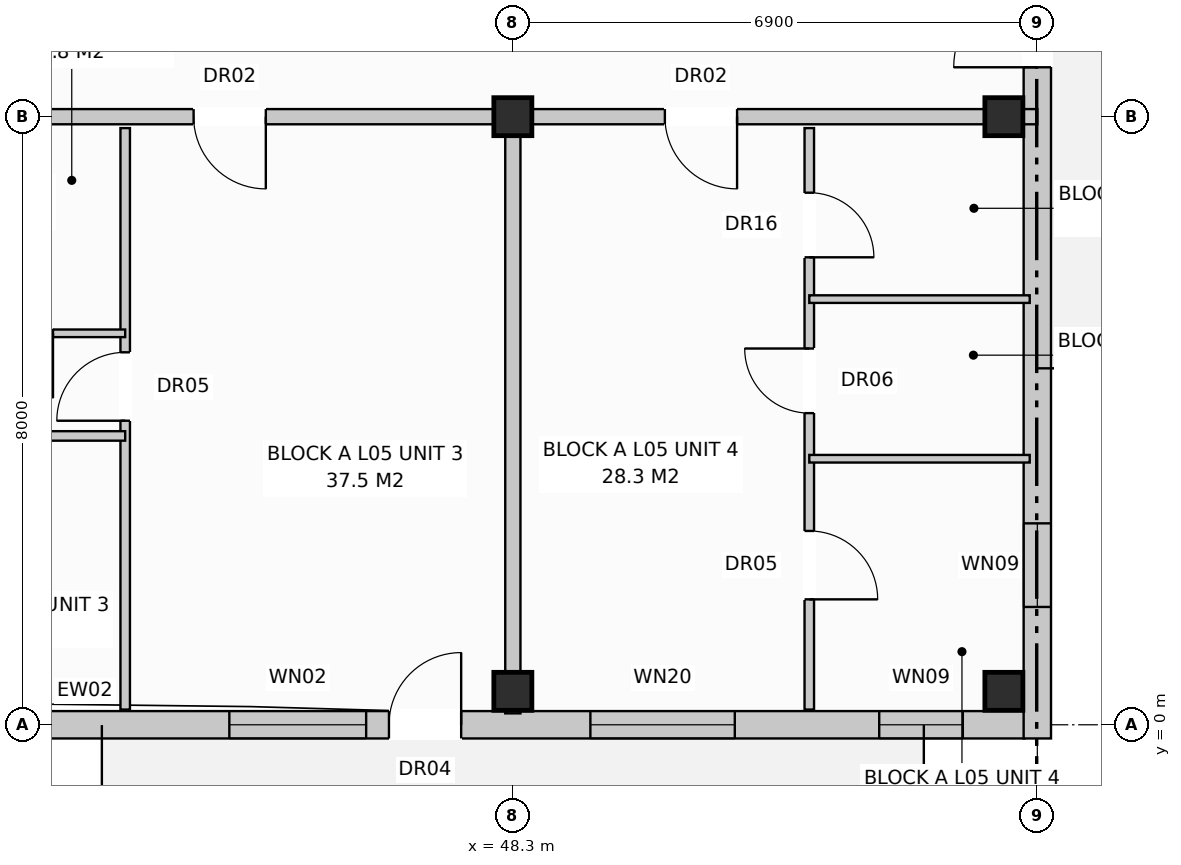
"""IFC4 building model, lengths in metres.
Left out: names, types, materials, properties, quantities, classifications, styles, units other than length and angle.
Written with IfcOpenShell. Run it as: python <this file> out.ifc"""

import sys

from ifc_helpers import new_model, si_unit, direction, frame, frame_2d, origin, origin_with_axes, origin_2d, place, context, subcontext, project, spatial, rectangle, extrude, element, fill, save


model = new_model("IFC4")
c1 = context("Model", 3, precision=1e-05, world=origin(), true_north=direction((0.0, 1.0)))
c2 = subcontext(c1, "Body", "Model", "MODEL_VIEW")
j1 = project(units=[si_unit("LENGTHUNIT", "METRE"), si_unit("PLANEANGLEUNIT", "RADIAN")], contexts=[c1])
p1 = place(None, origin())
s1 = spatial("IfcSite", under=j1, at=p1, CompositionType="ELEMENT")
p2 = place(p1, origin())
s2 = spatial("IfcBuilding", under=s1, at=p2, CompositionType="ELEMENT")
p3 = place(p2, frame((0.0, 0.0, 17.6)))
s3 = spatial("IfcBuildingStorey", under=s2, at=p3, CompositionType="ELEMENT", Elevation=17.6)
for number, where, z_axis, x_axis in (
    (1, (48.3, 0.44, 0.0), (0.0, 0.0, 1.0), (1.0, 0.0, 0.0)),
    (2, (48.3, 8.0, 0.0), (0.0, 0.0, 1.0), (1.0, 0.0, 0.0)),
    (3, (54.76, 0.44, 0.0), (0.0, 0.0, 1.0), (1.0, 0.0, 0.0)),
    (4, (54.76, 8.0, 0.0), (0.0, 0.0, 1.0), (1.0, 0.0, 0.0)),
):
    element("IfcColumn", number, at=place(p3, frame(where, z_axis=z_axis, x_axis=x_axis)), inside=s3, PredefinedType="COLUMN", context=c2, shape_type="SweptSolid", body=[
        extrude(rectangle(XDim=0.5, YDim=0.5, at=origin_2d()), origin(), (0.0, 0.0, 1.0), 3.2),
    ])
p4 = place(p3, frame((0.17, 0.0, 0.0), z_axis=(0.0, 0.0, 1.0), x_axis=(1.0, 0.0, 0.0)))
e5 = element("IfcWall", 5, at=p4, inside=s3, PredefinedType="STANDARD", context=c2, shape_type="SweptSolid", body=[
    extrude(rectangle(XDim=54.86, YDim=0.36, at=frame_2d((27.43, 0.0))), origin(), (0.0, 0.0, 1.0), 2.95),
])
p5 = place(p4, frame((3.823, 0.0, 0.0)))
e6 = element("IfcOpeningElement", 6, at=p5, cuts=e5, PredefinedType="OPENING", context=c2, shape_type="SweptSolid", body=[
    extrude(rectangle(XDim=0.95, YDim=2.1, at=frame_2d((0.475, 1.05))), frame((0.0, 0.192, 0.0), z_axis=(0.0, -1.0, 0.0), x_axis=(1.0, 0.0, 0.0)), (0.0, 0.0, 1.0), 0.384),
])
p6 = place(p4, frame((18.723, 0.0, 0.0)))
e7 = element("IfcOpeningElement", 7, at=p6, cuts=e5, PredefinedType="OPENING", context=c2, shape_type="SweptSolid", body=[
    extrude(rectangle(XDim=0.95, YDim=2.1, at=frame_2d((0.475, 1.05))), frame((0.0, 0.192, 0.0), z_axis=(0.0, -1.0, 0.0), x_axis=(1.0, 0.0, 0.0)), (0.0, 0.0, 1.0), 0.384),
])
p7 = place(p4, frame((29.123, 0.0, 0.0)))
e8 = element("IfcOpeningElement", 8, at=p7, cuts=e5, PredefinedType="OPENING", context=c2, shape_type="SweptSolid", body=[
    extrude(rectangle(XDim=0.95, YDim=2.1, at=frame_2d((0.475, 1.05))), frame((0.0, 0.192, 0.0), z_axis=(0.0, -1.0, 0.0), x_axis=(1.0, 0.0, 0.0)), (0.0, 0.0, 1.0), 0.384),
])
p8 = place(p4, frame((46.5, 0.0, 0.0)))
e9 = element("IfcOpeningElement", 9, at=p8, cuts=e5, PredefinedType="OPENING", context=c2, shape_type="SweptSolid", body=[
    extrude(rectangle(XDim=0.95, YDim=2.1, at=frame_2d((0.475, 1.05))), frame((0.0, 0.192, 0.0), z_axis=(0.0, -1.0, 0.0), x_axis=(1.0, 0.0, 0.0)), (0.0, 0.0, 1.0), 0.384),
])
p9 = place(p4, frame((1.6, 0.0, 0.8)))
e10 = element("IfcOpeningElement", 10, at=p9, cuts=e5, PredefinedType="OPENING", context=c2, shape_type="SweptSolid", body=[
    extrude(rectangle(XDim=1.8, YDim=1.7, at=frame_2d((0.9, 0.85))), frame((0.0, 0.192, 0.0), z_axis=(0.0, -1.0, 0.0), x_axis=(1.0, 0.0, 0.0)), (0.0, 0.0, 1.0), 0.384),
])
p10 = place(p4, frame((7.232, 0.0, 0.72)))
e11 = element("IfcOpeningElement", 11, at=p10, cuts=e5, PredefinedType="OPENING", context=c2, shape_type="SweptSolid", body=[
    extrude(rectangle(XDim=1.9, YDim=1.85, at=frame_2d((0.95, 0.925))), frame((0.0, 0.192, 0.0), z_axis=(0.0, -1.0, 0.0), x_axis=(1.0, 0.0, 0.0)), (0.0, 0.0, 1.0), 0.384),
])
p11 = place(p4, frame((10.425, 0.0, 0.8)))
e12 = element("IfcOpeningElement", 12, at=p11, cuts=e5, PredefinedType="OPENING", context=c2, shape_type="SweptSolid", body=[
    extrude(rectangle(XDim=1.95, YDim=1.65, at=frame_2d((0.975, 0.825))), frame((0.0, 0.192, 0.0), z_axis=(0.0, -1.0, 0.0), x_axis=(1.0, 0.0, 0.0)), (0.0, 0.0, 1.0), 0.384),
])
p12 = place(p4, frame((15.9, 0.0, 0.8)))
e13 = element("IfcOpeningElement", 13, at=p12, cuts=e5, PredefinedType="OPENING", context=c2, shape_type="SweptSolid", body=[
    extrude(rectangle(XDim=1.8, YDim=1.7, at=frame_2d((0.9, 0.85))), frame((0.0, 0.192, 0.0), z_axis=(0.0, -1.0, 0.0), x_axis=(1.0, 0.0, 0.0)), (0.0, 0.0, 1.0), 0.384),
])
p13 = place(p4, frame((21.55, 0.0, 0.72)))
e14 = element("IfcOpeningElement", 14, at=p13, cuts=e5, PredefinedType="OPENING", context=c2, shape_type="SweptSolid", body=[
    extrude(rectangle(XDim=1.9, YDim=1.85, at=frame_2d((0.95, 0.925))), frame((0.0, 0.192, 0.0), z_axis=(0.0, -1.0, 0.0), x_axis=(1.0, 0.0, 0.0)), (0.0, 0.0, 1.0), 0.384),
])
p14 = place(p4, frame((25.6, 0.0, 0.72)))
e15 = element("IfcOpeningElement", 15, at=p14, cuts=e5, PredefinedType="OPENING", context=c2, shape_type="SweptSolid", body=[
    extrude(rectangle(XDim=1.1, YDim=1.5, at=frame_2d((0.55, 0.75))), frame((0.0, 0.192, 0.0), z_axis=(0.0, -1.0, 0.0), x_axis=(1.0, 0.0, 0.0)), (0.0, 0.0, 1.0), 0.384),
])
p15 = place(p4, frame((31.4, 0.0, 0.8)))
e16 = element("IfcOpeningElement", 16, at=p15, cuts=e5, PredefinedType="OPENING", context=c2, shape_type="SweptSolid", body=[
    extrude(rectangle(XDim=1.8, YDim=1.7, at=frame_2d((0.9, 0.85))), frame((0.0, 0.192, 0.0), z_axis=(0.0, -1.0, 0.0), x_axis=(1.0, 0.0, 0.0)), (0.0, 0.0, 1.0), 0.384),
])
p16 = place(p4, frame((35.55, 0.0, 0.72)))
e17 = element("IfcOpeningElement", 17, at=p16, cuts=e5, PredefinedType="OPENING", context=c2, shape_type="SweptSolid", body=[
    extrude(rectangle(XDim=1.9, YDim=1.85, at=frame_2d((0.95, 0.925))), frame((0.0, 0.192, 0.0), z_axis=(0.0, -1.0, 0.0), x_axis=(1.0, 0.0, 0.0)), (0.0, 0.0, 1.0), 0.384),
])
p17 = place(p4, frame((39.25, 0.0, 0.72)))
e18 = element("IfcOpeningElement", 18, at=p17, cuts=e5, PredefinedType="OPENING", context=c2, shape_type="SweptSolid", body=[
    extrude(rectangle(XDim=1.1, YDim=1.5, at=frame_2d((0.55, 0.75))), frame((0.0, 0.192, 0.0), z_axis=(0.0, -1.0, 0.0), x_axis=(1.0, 0.0, 0.0)), (0.0, 0.0, 1.0), 0.384),
])
p18 = place(p4, frame((44.4, 0.0, 0.8)))
e19 = element("IfcOpeningElement", 19, at=p18, cuts=e5, PredefinedType="OPENING", context=c2, shape_type="SweptSolid", body=[
    extrude(rectangle(XDim=1.8, YDim=1.7, at=frame_2d((0.9, 0.85))), frame((0.0, 0.192, 0.0), z_axis=(0.0, -1.0, 0.0), x_axis=(1.0, 0.0, 0.0)), (0.0, 0.0, 1.0), 0.384),
])
p19 = place(p4, frame((49.15, 0.0, 0.72)))
e20 = element("IfcOpeningElement", 20, at=p19, cuts=e5, PredefinedType="OPENING", context=c2, shape_type="SweptSolid", body=[
    extrude(rectangle(XDim=1.9, YDim=1.85, at=frame_2d((0.95, 0.925))), frame((0.0, 0.192, 0.0), z_axis=(0.0, -1.0, 0.0), x_axis=(1.0, 0.0, 0.0)), (0.0, 0.0, 1.0), 0.384),
])
p20 = place(p4, frame((52.95, 0.0, 0.72)))
e21 = element("IfcOpeningElement", 21, at=p20, cuts=e5, PredefinedType="OPENING", context=c2, shape_type="SweptSolid", body=[
    extrude(rectangle(XDim=1.1, YDim=1.5, at=frame_2d((0.55, 0.75))), frame((0.0, 0.192, 0.0), z_axis=(0.0, -1.0, 0.0), x_axis=(1.0, 0.0, 0.0)), (0.0, 0.0, 1.0), 0.384),
])
p21 = place(p3, frame((55.2, -0.18, 0.0), z_axis=(0.0, 0.0, 1.0), x_axis=(0.0, 1.0, 0.0)))
e22 = element("IfcWall", 22, at=p21, inside=s3, PredefinedType="STANDARD", context=c2, shape_type="SweptSolid", body=[
    extrude(rectangle(XDim=18.76, YDim=0.36, at=frame_2d((9.38, 0.0))), origin(), (0.0, 0.0, 1.0), 2.95),
])
p22 = place(p21, frame((8.83, 0.0, 0.0)))
e23 = element("IfcOpeningElement", 23, at=p22, cuts=e22, PredefinedType="OPENING", context=c2, shape_type="SweptSolid", body=[
    extrude(rectangle(XDim=1.1, YDim=2.1, at=frame_2d((0.55, 1.05))), frame((0.0, 0.192, 0.0), z_axis=(0.0, -1.0, 0.0), x_axis=(1.0, 0.0, 0.0)), (0.0, 0.0, 1.0), 0.384),
])
p23 = place(p21, frame((1.73, 0.0, 0.72)))
e24 = element("IfcOpeningElement", 24, at=p23, cuts=e22, PredefinedType="OPENING", context=c2, shape_type="SweptSolid", body=[
    extrude(rectangle(XDim=1.1, YDim=1.5, at=frame_2d((0.55, 0.75))), frame((0.0, 0.192, 0.0), z_axis=(0.0, -1.0, 0.0), x_axis=(1.0, 0.0, 0.0)), (0.0, 0.0, 1.0), 0.384),
])
p24 = place(p21, frame((15.93, 0.0, 0.72)))
e25 = element("IfcOpeningElement", 25, at=p24, cuts=e22, PredefinedType="OPENING", context=c2, shape_type="SweptSolid", body=[
    extrude(rectangle(XDim=1.1, YDim=1.5, at=frame_2d((0.55, 0.75))), frame((0.0, 0.192, 0.0), z_axis=(0.0, -1.0, 0.0), x_axis=(1.0, 0.0, 0.0)), (0.0, 0.0, 1.0), 0.384),
])
p25 = place(p3, frame((48.3, 7.85, 0.0), z_axis=(0.0, 0.0, 1.0), x_axis=(0.0, -1.0, 0.0)))
e26 = element("IfcWall", 26, at=p25, inside=s3, PredefinedType="PARTITIONING", context=c2, shape_type="SweptSolid", body=[
    extrude(rectangle(XDim=7.7, YDim=0.2, at=frame_2d((3.85, 0.0))), origin(), (0.0, 0.0, 1.0), 2.39),
])
p26 = place(p3, frame((34.5, 8.0, 0.0), z_axis=(0.0, 0.0, 1.0), x_axis=(1.0, 0.0, 0.0)))
e27 = element("IfcWall", 27, at=p26, inside=s3, PredefinedType="PARTITIONING", context=c2, shape_type="SweptSolid", body=[
    extrude(rectangle(XDim=13.8, YDim=0.2, at=frame_2d((6.9, 0.0))), origin(), (0.0, 0.0, 1.0), 2.39),
])
p27 = place(p26, frame((9.6, 0.0, 0.0)))
e28 = element("IfcOpeningElement", 28, at=p27, cuts=e27, PredefinedType="OPENING", context=c2, shape_type="SweptSolid", body=[
    extrude(rectangle(XDim=0.95, YDim=2.15, at=frame_2d((0.475, 1.075))), frame((0.0, 0.112, 0.0), z_axis=(0.0, -1.0, 0.0), x_axis=(1.0, 0.0, 0.0)), (0.0, 0.0, 1.0), 0.224),
])
p28 = place(p3, frame((43.2, 7.85, 0.0), z_axis=(0.0, 0.0, 1.0), x_axis=(0.0, -1.0, 0.0)))
e29 = element("IfcWall", 29, at=p28, inside=s3, PredefinedType="PARTITIONING", context=c2, shape_type="SweptSolid", body=[
    extrude(rectangle(XDim=7.65, YDim=0.125, at=frame_2d((3.825, 0.0))), origin(), (0.0, 0.0, 1.0), 2.95),
])
p29 = place(p28, frame((2.95, 0.0, 0.0)))
e30 = element("IfcOpeningElement", 30, at=p29, cuts=e29, PredefinedType="OPENING", context=c2, shape_type="SweptSolid", body=[
    extrude(rectangle(XDim=0.9, YDim=2.1, at=frame_2d((0.45, 1.05))), frame((0.0, 0.074, 0.0), z_axis=(0.0, -1.0, 0.0), x_axis=(1.0, 0.0, 0.0)), (0.0, 0.0, 1.0), 0.149),
])
p30 = place(p3, frame((34.6, 5.15, 0.0), z_axis=(0.0, 0.0, 1.0), x_axis=(1.0, 0.0, 0.0)))
e31 = element("IfcWall", 31, at=p30, inside=s3, PredefinedType="PARTITIONING", context=c2, shape_type="SweptSolid", body=[
    extrude(rectangle(XDim=8.6, YDim=0.1, at=frame_2d((4.3, 0.0))), origin(), (0.0, 0.0, 1.0), 2.95),
])
p31 = place(p30, frame((1.4, 0.0, 0.0)))
e32 = element("IfcOpeningElement", 32, at=p31, cuts=e31, PredefinedType="OPENING", context=c2, shape_type="SweptSolid", body=[
    extrude(rectangle(XDim=0.85, YDim=2.05, at=frame_2d((0.425, 1.025))), frame((0.0, 0.062, 0.0), z_axis=(0.0, -1.0, 0.0), x_axis=(1.0, 0.0, 0.0)), (0.0, 0.0, 1.0), 0.124),
])
p32 = place(p30, frame((4.65, 0.0, 0.0)))
e33 = element("IfcOpeningElement", 33, at=p32, cuts=e31, PredefinedType="OPENING", context=c2, shape_type="SweptSolid", body=[
    extrude(rectangle(XDim=0.85, YDim=2.05, at=frame_2d((0.425, 1.025))), frame((0.0, 0.062, 0.0), z_axis=(0.0, -1.0, 0.0), x_axis=(1.0, 0.0, 0.0)), (0.0, 0.0, 1.0), 0.124),
])
p33 = place(p30, frame((6.8, 0.0, 0.0)))
e34 = element("IfcOpeningElement", 34, at=p33, cuts=e31, PredefinedType="OPENING", context=c2, shape_type="SweptSolid", body=[
    extrude(rectangle(XDim=0.85, YDim=2.1, at=frame_2d((0.425, 1.05))), frame((0.0, 0.062, 0.0), z_axis=(0.0, -1.0, 0.0), x_axis=(1.0, 0.0, 0.0)), (0.0, 0.0, 1.0), 0.124),
])
p34 = place(p3, frame((38.7, 3.8, 0.0), z_axis=(0.0, 0.0, 1.0), x_axis=(1.0, 0.0, 0.0)))
e35 = element("IfcWall", 35, at=p34, inside=s3, PredefinedType="PARTITIONING", context=c2, shape_type="SweptSolid", body=[
    extrude(rectangle(XDim=4.5, YDim=0.125, at=frame_2d((2.25, 0.0))), origin(), (0.0, 0.0, 1.0), 2.95),
])
p35 = place(p34, frame((1.6, 0.0, 0.0)))
e36 = element("IfcOpeningElement", 36, at=p35, cuts=e35, PredefinedType="OPENING", context=c2, shape_type="SweptSolid", body=[
    extrude(rectangle(XDim=0.9, YDim=2.1, at=frame_2d((0.45, 1.05))), frame((0.0, 0.074, 0.0), z_axis=(0.0, -1.0, 0.0), x_axis=(1.0, 0.0, 0.0)), (0.0, 0.0, 1.0), 0.149),
])
p36 = place(p3, frame((48.3, 8.0, 0.0), z_axis=(0.0, 0.0, 1.0), x_axis=(1.0, 0.0, 0.0)))
e37 = element("IfcWall", 37, at=p36, inside=s3, PredefinedType="PARTITIONING", context=c2, shape_type="SweptSolid", body=[
    extrude(rectangle(XDim=6.9, YDim=0.2, at=frame_2d((3.45, 0.0))), origin(), (0.0, 0.0, 1.0), 2.39),
])
p37 = place(p36, frame((2.0, 0.0, 0.0)))
e38 = element("IfcOpeningElement", 38, at=p37, cuts=e37, PredefinedType="OPENING", context=c2, shape_type="SweptSolid", body=[
    extrude(rectangle(XDim=0.95, YDim=2.15, at=frame_2d((0.475, 1.075))), frame((0.0, 0.112, 0.0), z_axis=(0.0, -1.0, 0.0), x_axis=(1.0, 0.0, 0.0)), (0.0, 0.0, 1.0), 0.224),
])
p38 = place(p3, frame((52.2, 7.85, 0.0), z_axis=(0.0, 0.0, 1.0), x_axis=(0.0, -1.0, 0.0)))
e39 = element("IfcWall", 39, at=p38, inside=s3, PredefinedType="PARTITIONING", context=c2, shape_type="SweptSolid", body=[
    extrude(rectangle(XDim=7.65, YDim=0.125, at=frame_2d((3.825, 0.0))), origin(), (0.0, 0.0, 1.0), 2.95),
])
p39 = place(p38, frame((0.85, 0.0, 0.0)))
e40 = element("IfcOpeningElement", 40, at=p39, cuts=e39, PredefinedType="OPENING", context=c2, shape_type="SweptSolid", body=[
    extrude(rectangle(XDim=0.85, YDim=2.1, at=frame_2d((0.425, 1.05))), frame((0.0, 0.074, 0.0), z_axis=(0.0, -1.0, 0.0), x_axis=(1.0, 0.0, 0.0)), (0.0, 0.0, 1.0), 0.149),
])
p40 = place(p38, frame((2.9, 0.0, 0.0)))
e41 = element("IfcOpeningElement", 41, at=p40, cuts=e39, PredefinedType="OPENING", context=c2, shape_type="SweptSolid", body=[
    extrude(rectangle(XDim=0.85, YDim=2.05, at=frame_2d((0.425, 1.025))), frame((0.0, 0.074, 0.0), z_axis=(0.0, -1.0, 0.0), x_axis=(1.0, 0.0, 0.0)), (0.0, 0.0, 1.0), 0.149),
])
p41 = place(p38, frame((5.3, 0.0, 0.0)))
e42 = element("IfcOpeningElement", 42, at=p41, cuts=e39, PredefinedType="OPENING", context=c2, shape_type="SweptSolid", body=[
    extrude(rectangle(XDim=0.9, YDim=2.1, at=frame_2d((0.45, 1.05))), frame((0.0, 0.074, 0.0), z_axis=(0.0, -1.0, 0.0), x_axis=(1.0, 0.0, 0.0)), (0.0, 0.0, 1.0), 0.149),
])
for number, where, z_axis, x_axis in (
    (43, (52.2, 5.6, 0.0), (0.0, 0.0, 1.0), (1.0, 0.0, 0.0)),
    (44, (52.2, 3.5, 0.0), (0.0, 0.0, 1.0), (1.0, 0.0, 0.0)),
):
    element("IfcWall", number, at=place(p3, frame(where, z_axis=z_axis, x_axis=x_axis)), inside=s3, PredefinedType="PARTITIONING", context=c2, shape_type="SweptSolid", body=[
        extrude(rectangle(XDim=2.9, YDim=0.1, at=frame_2d((1.45, 0.0))), origin(), (0.0, 0.0, 1.0), 2.95),
    ])
p42 = place(p8, origin_with_axes())
e45 = element("IfcDoor", 45, at=p42, inside=s3, OperationType="SINGLE_SWING_RIGHT", PredefinedType="DOOR", context=c2, shape_type="SweptSolid", body=[
    extrude(rectangle(XDim=0.95, YDim=2.1, at=frame_2d((0.475, 1.05))), frame((0.0, 0.025, 0.0), z_axis=(0.0, -1.0, 0.0), x_axis=(1.0, 0.0, 0.0)), (0.0, 0.0, 1.0), 0.05),
])
fill(e9, e45)
p43 = place(p18, origin_with_axes())
e46 = element("IfcWindow", 46, at=p43, inside=s3, PartitioningType="SINGLE_PANEL", PredefinedType="WINDOW", context=c2, shape_type="SweptSolid", body=[
    extrude(rectangle(XDim=1.8, YDim=1.7, at=frame_2d((0.9, 0.85))), frame((0.0, 0.03, 0.0), z_axis=(0.0, -1.0, 0.0), x_axis=(1.0, 0.0, 0.0)), (0.0, 0.0, 1.0), 0.06),
])
fill(e19, e46)
p44 = place(p19, origin_with_axes())
e47 = element("IfcWindow", 47, at=p44, inside=s3, PartitioningType="SINGLE_PANEL", PredefinedType="WINDOW", context=c2, shape_type="SweptSolid", body=[
    extrude(rectangle(XDim=1.9, YDim=1.85, at=frame_2d((0.95, 0.925))), frame((0.0, 0.03, 0.0), z_axis=(0.0, -1.0, 0.0), x_axis=(1.0, 0.0, 0.0)), (0.0, 0.0, 1.0), 0.06),
])
fill(e20, e47)
p45 = place(p20, origin_with_axes())
e48 = element("IfcWindow", 48, at=p45, inside=s3, PartitioningType="SINGLE_PANEL", PredefinedType="WINDOW", context=c2, shape_type="SweptSolid", body=[
    extrude(rectangle(XDim=1.1, YDim=1.5, at=frame_2d((0.55, 0.75))), frame((0.0, 0.03, 0.0), z_axis=(0.0, -1.0, 0.0), x_axis=(1.0, 0.0, 0.0)), (0.0, 0.0, 1.0), 0.06),
])
fill(e21, e48)
p46 = place(p22, origin_with_axes())
e49 = element("IfcDoor", 49, at=p46, inside=s3, OperationType="SINGLE_SWING_LEFT", PredefinedType="DOOR", context=c2, shape_type="SweptSolid", body=[
    extrude(rectangle(XDim=1.1, YDim=2.1, at=frame_2d((0.55, 1.05))), frame((0.0, 0.025, 0.0), z_axis=(0.0, -1.0, 0.0), x_axis=(1.0, 0.0, 0.0)), (0.0, 0.0, 1.0), 0.05),
])
fill(e23, e49)
p47 = place(p23, origin_with_axes())
e50 = element("IfcWindow", 50, at=p47, inside=s3, PartitioningType="SINGLE_PANEL", PredefinedType="WINDOW", context=c2, shape_type="SweptSolid", body=[
    extrude(rectangle(XDim=1.1, YDim=1.5, at=frame_2d((0.55, 0.75))), frame((0.0, 0.03, 0.0), z_axis=(0.0, -1.0, 0.0), x_axis=(1.0, 0.0, 0.0)), (0.0, 0.0, 1.0), 0.06),
])
fill(e24, e50)
p48 = place(p27, frame((0.95, 0.0, 0.0), z_axis=(0.0, 0.0, 1.0), x_axis=(-1.0, 0.0, 0.0)))
e51 = element("IfcDoor", 51, at=p48, inside=s3, OperationType="SINGLE_SWING_RIGHT", PredefinedType="DOOR", context=c2, shape_type="SweptSolid", body=[
    extrude(rectangle(XDim=0.95, YDim=2.15, at=frame_2d((0.475, 1.075))), frame((0.0, 0.025, 0.0), z_axis=(0.0, -1.0, 0.0), x_axis=(1.0, 0.0, 0.0)), (0.0, 0.0, 1.0), 0.05),
])
fill(e28, e51)
p49 = place(p29, frame((0.9, 0.0, 0.0), z_axis=(0.0, 0.0, 1.0), x_axis=(-1.0, 0.0, 0.0)))
e52 = element("IfcDoor", 52, at=p49, inside=s3, OperationType="SINGLE_SWING_RIGHT", PredefinedType="DOOR", context=c2, shape_type="SweptSolid", body=[
    extrude(rectangle(XDim=0.9, YDim=2.1, at=frame_2d((0.45, 1.05))), frame((0.0, 0.025, 0.0), z_axis=(0.0, -1.0, 0.0), x_axis=(1.0, 0.0, 0.0)), (0.0, 0.0, 1.0), 0.05),
])
fill(e30, e52)
p50 = place(p33, frame((0.85, 0.0, 0.0), z_axis=(0.0, 0.0, 1.0), x_axis=(-1.0, 0.0, 0.0)))
e53 = element("IfcDoor", 53, at=p50, inside=s3, OperationType="SINGLE_SWING_RIGHT", PredefinedType="DOOR", context=c2, shape_type="SweptSolid", body=[
    extrude(rectangle(XDim=0.85, YDim=2.1, at=frame_2d((0.425, 1.05))), frame((0.0, 0.025, 0.0), z_axis=(0.0, -1.0, 0.0), x_axis=(1.0, 0.0, 0.0)), (0.0, 0.0, 1.0), 0.05),
])
fill(e34, e53)
p51 = place(p37, frame((0.95, 0.0, 0.0), z_axis=(0.0, 0.0, 1.0), x_axis=(-1.0, 0.0, 0.0)))
e54 = element("IfcDoor", 54, at=p51, inside=s3, OperationType="SINGLE_SWING_RIGHT", PredefinedType="DOOR", context=c2, shape_type="SweptSolid", body=[
    extrude(rectangle(XDim=0.95, YDim=2.15, at=frame_2d((0.475, 1.075))), frame((0.0, 0.025, 0.0), z_axis=(0.0, -1.0, 0.0), x_axis=(1.0, 0.0, 0.0)), (0.0, 0.0, 1.0), 0.05),
])
fill(e38, e54)
p52 = place(p39, origin_with_axes())
e55 = element("IfcDoor", 55, at=p52, inside=s3, OperationType="SINGLE_SWING_RIGHT", PredefinedType="DOOR", context=c2, shape_type="SweptSolid", body=[
    extrude(rectangle(XDim=0.85, YDim=2.1, at=frame_2d((0.425, 1.05))), frame((0.0, 0.025, 0.0), z_axis=(0.0, -1.0, 0.0), x_axis=(1.0, 0.0, 0.0)), (0.0, 0.0, 1.0), 0.05),
])
fill(e40, e55)
p53 = place(p40, frame((0.85, 0.0, 0.0), z_axis=(0.0, 0.0, 1.0), x_axis=(-1.0, 0.0, 0.0)))
e56 = element("IfcDoor", 56, at=p53, inside=s3, OperationType="SINGLE_SWING_LEFT", PredefinedType="DOOR", context=c2, shape_type="SweptSolid", body=[
    extrude(rectangle(XDim=0.85, YDim=2.05, at=frame_2d((0.425, 1.025))), frame((0.0, 0.025, 0.0), z_axis=(0.0, -1.0, 0.0), x_axis=(1.0, 0.0, 0.0)), (0.0, 0.0, 1.0), 0.05),
])
fill(e41, e56)
p54 = place(p41, origin_with_axes())
e57 = element("IfcDoor", 57, at=p54, inside=s3, OperationType="SINGLE_SWING_RIGHT", PredefinedType="DOOR", context=c2, shape_type="SweptSolid", body=[
    extrude(rectangle(XDim=0.9, YDim=2.1, at=frame_2d((0.45, 1.05))), frame((0.0, 0.025, 0.0), z_axis=(0.0, -1.0, 0.0), x_axis=(1.0, 0.0, 0.0)), (0.0, 0.0, 1.0), 0.05),
])
fill(e42, e57)
save(model, sys.argv[1])
